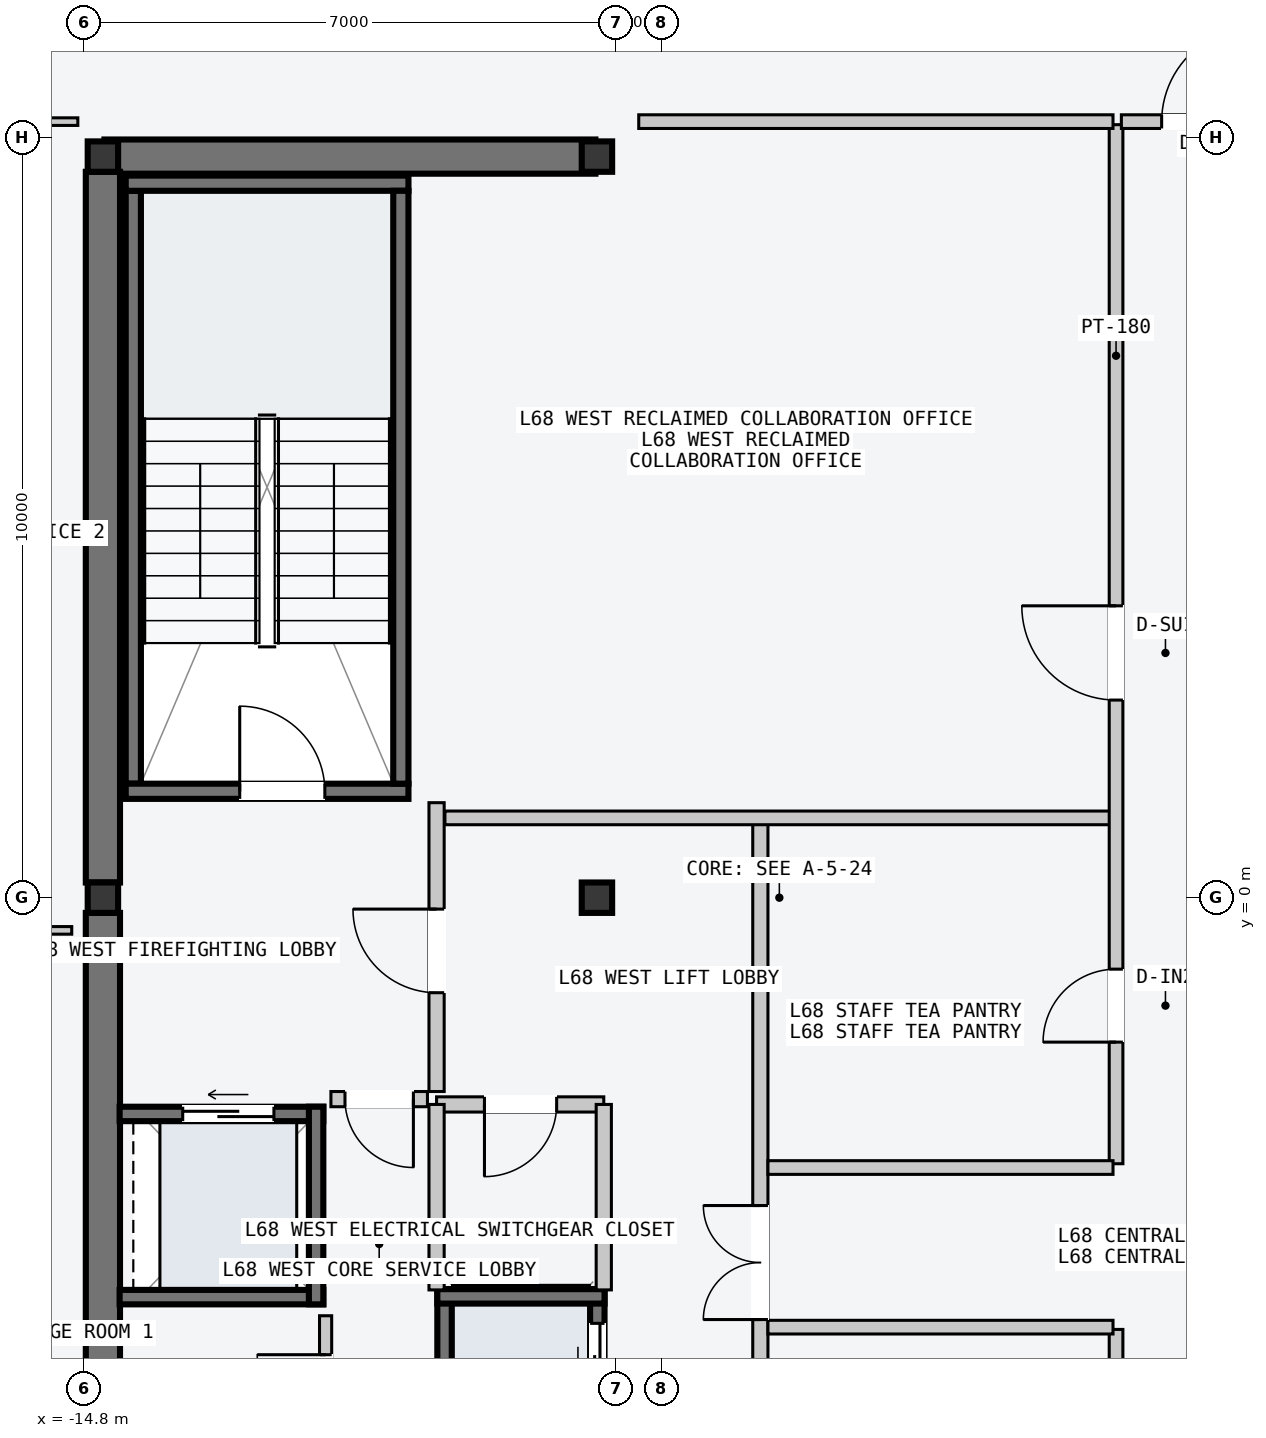
"""IFC4 building model, lengths in metres.
Left out: names, types, materials, properties, quantities, classifications, styles, units other than length and angle.
Written with IfcOpenShell. Run it as: python <this file> out.ifc"""

import sys

from ifc_helpers import new_model, si_unit, direction, frame, frame_2d, origin, origin_2d, place, context, subcontext, project, spatial, rectangle, i_section, extrude, element, fill, save


model = new_model("IFC4")
c1 = context("Model", 3, precision=1e-05, world=origin(), true_north=direction((0.0, 1.0)))
c2 = subcontext(c1, "Body", "Model", "MODEL_VIEW")
j1 = project(units=[si_unit("LENGTHUNIT", "METRE"), si_unit("PLANEANGLEUNIT", "RADIAN")], contexts=[c1])
p1 = place(None, origin())
s1 = spatial("IfcSite", under=j1, at=p1, CompositionType="ELEMENT")
p2 = place(p1, origin())
s2 = spatial("IfcBuilding", under=s1, at=p2, CompositionType="ELEMENT")
p3 = place(p2, frame((0.0, 0.0, 258.0)))
s3 = spatial("IfcBuildingStorey", under=s2, at=p3, CompositionType="ELEMENT", Elevation=258.0)
p4 = place(p3, frame((-14.53, 9.75, -0.2), z_axis=(0.0, 0.0, 1.0), x_axis=(1.0, 0.0, 0.0)))
e1 = element("IfcWall", 1, at=p4, inside=s3, PredefinedType="SHEAR", context=c2, shape_type="SweptSolid", body=[
    extrude(rectangle(XDim=6.46, YDim=0.45, at=frame_2d((3.23, 0.0))), origin(), (0.0, 0.0, 1.0), 3.6),
])
for number, where, z_axis, x_axis in (
    (2, (-14.55, -9.55, -0.2), (0.0, 0.0, 1.0), (0.0, 1.0, 0.0)),
    (3, (-14.55, 0.2, -0.2), (0.0, 0.0, 1.0), (0.0, 1.0, 0.0)),
):
    element("IfcWall", number, at=place(p3, frame(where, z_axis=z_axis, x_axis=x_axis)), inside=s3, PredefinedType="SHEAR", context=c2, shape_type="SweptSolid", body=[
        extrude(rectangle(XDim=9.35, YDim=0.45, at=frame_2d((4.675, 0.0))), origin(), (0.0, 0.0, 1.0), 3.6),
    ])
p5 = place(p3, frame((-14.15, 1.5, -0.2), z_axis=(0.0, 0.0, 1.0), x_axis=(0.0, 1.0, 0.0)))
e4 = element("IfcWall", 4, at=p5, inside=s3, PredefinedType="SOLIDWALL", context=c2, shape_type="SweptSolid", body=[
    extrude(rectangle(XDim=7.8, YDim=0.2, at=frame_2d((3.9, 0.0))), origin(), (0.0, 0.0, 1.0), 3.6),
])
p6 = place(p3, frame((-14.25, 1.4, -0.2), z_axis=(0.0, 0.0, 1.0), x_axis=(1.0, 0.0, 0.0)))
e5 = element("IfcWall", 5, at=p6, inside=s3, PredefinedType="SOLIDWALL", context=c2, shape_type="SweptSolid", body=[
    extrude(rectangle(XDim=3.72, YDim=0.2, at=frame_2d((1.86, 0.0))), origin(), (0.0, 0.0, 1.0), 3.6),
])
p7 = place(p6, frame((1.5, 0.0, 0.2)))
e6 = element("IfcOpeningElement", 6, at=p7, cuts=e5, PredefinedType="OPENING", context=c2, shape_type="SweptSolid", body=[
    extrude(rectangle(XDim=1.12, YDim=2.18, at=frame_2d((0.56, 1.09))), frame((0.0, 0.11, 0.0), z_axis=(0.0, -1.0, 0.0), x_axis=(1.0, 0.0, 0.0)), (0.0, 0.0, 1.0), 0.22),
])
p8 = place(p3, frame((-14.25, 9.4, -0.2), z_axis=(0.0, 0.0, 1.0), x_axis=(1.0, 0.0, 0.0)))
e7 = element("IfcWall", 7, at=p8, inside=s3, PredefinedType="SOLIDWALL", context=c2, shape_type="SweptSolid", body=[
    extrude(rectangle(XDim=3.72, YDim=0.2, at=frame_2d((1.86, 0.0))), origin(), (0.0, 0.0, 1.0), 3.6),
])
p9 = place(p3, frame((-10.63, 1.5, -0.2), z_axis=(0.0, 0.0, 1.0), x_axis=(0.0, 1.0, 0.0)))
e8 = element("IfcWall", 8, at=p9, inside=s3, PredefinedType="SOLIDWALL", context=c2, shape_type="SweptSolid", body=[
    extrude(rectangle(XDim=7.8, YDim=0.2, at=frame_2d((3.9, 0.0))), origin(), (0.0, 0.0, 1.0), 3.6),
])
for number, where, z_axis, x_axis in (
    (9, (-14.55, 0.0, 0.0), (0.0, 0.0, 1.0), (1.0, 0.0, 0.0)),
    (10, (-14.55, 9.75, 0.0), (0.0, 0.0, 1.0), (1.0, 0.0, 0.0)),
    (11, (-8.05, 0.0, 0.0), (0.0, 0.0, 1.0), (1.0, 0.0, 0.0)),
    (12, (-8.05, 9.75, 0.0), (0.0, 0.0, 1.0), (1.0, 0.0, 0.0)),
):
    element("IfcColumn", number, at=place(p3, frame(where, z_axis=z_axis, x_axis=x_axis)), inside=s3, PredefinedType="COLUMN", context=c2, shape_type="SweptSolid", body=[
        extrude(i_section(OverallWidth=0.4, OverallDepth=0.4, WebThickness=0.013, FlangeThickness=0.021, at=origin_2d()), origin(), (0.0, 0.0, 1.0), 3.6),
    ])
p10 = place(p3, frame((-8.045, -7.15, -0.2), z_axis=(0.0, 0.0, 1.0), x_axis=(0.0, 1.0, 0.0)))
e13 = element("IfcWall", 13, at=p10, inside=s3, PredefinedType="SOLIDWALL", context=c2, shape_type="SweptSolid", body=[
    extrude(rectangle(XDim=2.0, YDim=0.19, at=frame_2d((1.0, 0.0))), origin(), (0.0, 0.0, 1.0), 3.6),
])
p11 = place(p10, frame((0.45, 0.0, 0.2)))
e14 = element("IfcOpeningElement", 14, at=p11, cuts=e13, PredefinedType="OPENING", context=c2, shape_type="SweptSolid", body=[
    extrude(rectangle(XDim=1.1, YDim=2.2, at=frame_2d((0.55, 1.1))), frame((0.0, 0.105, 0.0), z_axis=(0.0, -1.0, 0.0), x_axis=(1.0, 0.0, 0.0)), (0.0, 0.0, 1.0), 0.21),
])
p12 = place(p3, frame((-10.055, -7.15, -0.2), z_axis=(0.0, 0.0, 1.0), x_axis=(0.0, 1.0, 0.0)))
e15 = element("IfcWall", 15, at=p12, inside=s3, PredefinedType="SOLIDWALL", context=c2, shape_type="SweptSolid", body=[
    extrude(rectangle(XDim=2.0, YDim=0.19, at=frame_2d((1.0, 0.0))), origin(), (0.0, 0.0, 1.0), 3.6),
])
p13 = place(p3, frame((-10.15, -5.245, -0.2), z_axis=(0.0, 0.0, 1.0), x_axis=(1.0, 0.0, 0.0)))
e16 = element("IfcWall", 16, at=p13, inside=s3, PredefinedType="SOLIDWALL", context=c2, shape_type="SweptSolid", body=[
    extrude(rectangle(XDim=2.2, YDim=0.19, at=frame_2d((1.1, 0.0))), origin(), (0.0, 0.0, 1.0), 3.6),
])
p14 = place(p3, frame((-14.33, -2.845, -0.2), z_axis=(0.0, 0.0, 1.0), x_axis=(1.0, 0.0, 0.0)))
e17 = element("IfcWall", 17, at=p14, inside=s3, PredefinedType="SOLIDWALL", context=c2, shape_type="SweptSolid", body=[
    extrude(rectangle(XDim=2.68, YDim=0.19, at=frame_2d((1.34, 0.0))), origin(), (0.0, 0.0, 1.0), 3.6),
])
p15 = place(p14, frame((0.83, 0.0, 0.2)))
e18 = element("IfcOpeningElement", 18, at=p15, cuts=e17, PredefinedType="OPENING", context=c2, shape_type="SweptSolid", body=[
    extrude(rectangle(XDim=1.2, YDim=2.2, at=frame_2d((0.6, 1.1))), frame((0.0, 0.105, 0.0), z_axis=(0.0, -1.0, 0.0), x_axis=(1.0, 0.0, 0.0)), (0.0, 0.0, 1.0), 0.21),
])
p16 = place(p3, frame((-14.33, -5.255, -0.2), z_axis=(0.0, 0.0, 1.0), x_axis=(1.0, 0.0, 0.0)))
e19 = element("IfcWall", 19, at=p16, inside=s3, PredefinedType="SOLIDWALL", context=c2, shape_type="SweptSolid", body=[
    extrude(rectangle(XDim=2.68, YDim=0.19, at=frame_2d((1.34, 0.0))), origin(), (0.0, 0.0, 1.0), 3.6),
])
p17 = place(p3, frame((-11.745, -5.35, -0.2), z_axis=(0.0, 0.0, 1.0), x_axis=(0.0, 1.0, 0.0)))
e20 = element("IfcWall", 20, at=p17, inside=s3, PredefinedType="SOLIDWALL", context=c2, shape_type="SweptSolid", body=[
    extrude(rectangle(XDim=2.6, YDim=0.19, at=frame_2d((1.3, 0.0))), origin(), (0.0, 0.0, 1.0), 3.6),
])
p18 = place(p3, frame((-5.9, -9.45, 0.0), z_axis=(0.0, 0.0, 1.0), x_axis=(0.0, 1.0, 0.0)))
e21 = element("IfcWall", 21, at=p18, inside=s3, PredefinedType="PARTITIONING", context=c2, shape_type="SweptSolid", body=[
    extrude(rectangle(XDim=10.5, YDim=0.2, at=frame_2d((5.25, 0.0))), origin(), (0.0, 0.0, 1.0), 3.4),
])
p19 = place(p18, frame((3.9, 0.0, 0.0)))
e22 = element("IfcOpeningElement", 22, at=p19, cuts=e21, PredefinedType="OPENING", context=c2, shape_type="SweptSolid", body=[
    extrude(rectangle(XDim=1.5, YDim=2.2, at=frame_2d((0.75, 1.1))), frame((0.0, 0.11, 0.0), z_axis=(0.0, -1.0, 0.0), x_axis=(1.0, 0.0, 0.0)), (0.0, 0.0, 1.0), 0.22),
])
p20 = place(p3, frame((-10.16, -2.55, 0.0), z_axis=(0.0, 0.0, 1.0), x_axis=(0.0, 1.0, 0.0)))
e23 = element("IfcWall", 23, at=p20, inside=s3, PredefinedType="PARTITIONING", context=c2, shape_type="SweptSolid", body=[
    extrude(rectangle(XDim=3.8, YDim=0.2, at=frame_2d((1.9, 0.0))), origin(), (0.0, 0.0, 1.0), 3.4),
])
p21 = place(p20, frame((1.3, 0.0, 0.0)))
e24 = element("IfcOpeningElement", 24, at=p21, cuts=e23, PredefinedType="OPENING", context=c2, shape_type="SweptSolid", body=[
    extrude(rectangle(XDim=1.1, YDim=2.15, at=frame_2d((0.55, 1.075))), frame((0.0, 0.11, 0.0), z_axis=(0.0, -1.0, 0.0), x_axis=(1.0, 0.0, 0.0)), (0.0, 0.0, 1.0), 0.22),
])
p22 = place(p3, frame((-10.28, -2.65, 0.0), z_axis=(0.0, 0.0, 1.0), x_axis=(-1.0, 0.0, 0.0)))
e25 = element("IfcWall", 25, at=p22, inside=s3, PredefinedType="PARTITIONING", context=c2, shape_type="SweptSolid", body=[
    extrude(rectangle(XDim=1.27, YDim=0.2, at=frame_2d((0.635, 0.0))), origin(), (0.0, 0.0, 1.0), 3.4),
])
p23 = place(p22, frame((0.185, 0.0, 0.0)))
e26 = element("IfcOpeningElement", 26, at=p23, cuts=e25, PredefinedType="OPENING", context=c2, shape_type="SweptSolid", body=[
    extrude(rectangle(XDim=0.9, YDim=2.15, at=frame_2d((0.45, 1.075))), frame((0.0, 0.11, 0.0), z_axis=(0.0, -1.0, 0.0), x_axis=(1.0, 0.0, 0.0)), (0.0, 0.0, 1.0), 0.22),
])
p24 = place(p3, frame((-7.96, -2.72, 0.0), z_axis=(0.0, 0.0, 1.0), x_axis=(-1.0, 0.0, 0.0)))
e27 = element("IfcWall", 27, at=p24, inside=s3, PredefinedType="PARTITIONING", context=c2, shape_type="SweptSolid", body=[
    extrude(rectangle(XDim=2.2, YDim=0.2, at=frame_2d((1.1, 0.0))), origin(), (0.0, 0.0, 1.0), 3.4),
])
p25 = place(p24, frame((0.62, 0.0, 0.0)))
e28 = element("IfcOpeningElement", 28, at=p25, cuts=e27, PredefinedType="OPENING", context=c2, shape_type="SweptSolid", body=[
    extrude(rectangle(XDim=0.95, YDim=2.1, at=frame_2d((0.475, 1.05))), frame((0.0, 0.11, 0.0), z_axis=(0.0, -1.0, 0.0), x_axis=(1.0, 0.0, 0.0)), (0.0, 0.0, 1.0), 0.22),
])
for number, where, z_axis, x_axis in (
    (29, (-7.96, -5.16, 0.0), (0.0, 0.0, 1.0), (0.0, 1.0, 0.0)),
    (30, (-10.16, -5.16, 0.0), (0.0, 0.0, 1.0), (0.0, 1.0, 0.0)),
):
    element("IfcWall", number, at=place(p3, frame(where, z_axis=z_axis, x_axis=x_axis)), inside=s3, PredefinedType="PARTITIONING", context=c2, shape_type="SweptSolid", body=[
        extrude(rectangle(XDim=2.44, YDim=0.2, at=frame_2d((1.22, 0.0))), origin(), (0.0, 0.0, 1.0), 3.4),
    ])
p26 = place(p3, frame((-11.62, -9.35, 0.0), z_axis=(0.0, 0.0, 1.0), x_axis=(0.0, 1.0, 0.0)))
e31 = element("IfcWall", 31, at=p26, inside=s3, PredefinedType="PARTITIONING", context=c2, shape_type="SweptSolid", body=[
    extrude(rectangle(XDim=3.85, YDim=0.16, at=frame_2d((1.925, 0.0))), origin(), (0.0, 0.0, 1.0), 3.4),
])
p27 = place(p26, frame((0.512, 0.0, 0.0)))
e32 = element("IfcOpeningElement", 32, at=p27, cuts=e31, PredefinedType="OPENING", context=c2, shape_type="SweptSolid", body=[
    extrude(rectangle(XDim=0.9, YDim=2.15, at=frame_2d((0.45, 1.075))), frame((0.0, 0.09, 0.0), z_axis=(0.0, -1.0, 0.0), x_axis=(1.0, 0.0, 0.0)), (0.0, 0.0, 1.0), 0.18),
])
p28 = place(p26, frame((2.438, 0.0, 0.0)))
e33 = element("IfcOpeningElement", 33, at=p28, cuts=e31, PredefinedType="OPENING", context=c2, shape_type="SweptSolid", body=[
    extrude(rectangle(XDim=0.9, YDim=2.15, at=frame_2d((0.45, 1.075))), frame((0.0, 0.09, 0.0), z_axis=(0.0, -1.0, 0.0), x_axis=(1.0, 0.0, 0.0)), (0.0, 0.0, 1.0), 0.18),
])
p29 = place(p3, frame((-10.05, 1.05, 0.0), z_axis=(0.0, 0.0, 1.0), x_axis=(1.0, 0.0, 0.0)))
e34 = element("IfcWall", 34, at=p29, inside=s3, PredefinedType="PARTITIONING", context=c2, shape_type="SweptSolid", body=[
    extrude(rectangle(XDim=8.79, YDim=0.18, at=frame_2d((4.395, 0.0))), origin(), (0.0, 0.0, 1.0), 3.4),
])
p30 = place(p3, frame((-1.22, -3.5, 0.0), z_axis=(0.0, 0.0, 1.0), x_axis=(0.0, 1.0, 0.0)))
e35 = element("IfcWall", 35, at=p30, inside=s3, PredefinedType="PARTITIONING", context=c2, shape_type="SweptSolid", body=[
    extrude(rectangle(XDim=13.67, YDim=0.18, at=frame_2d((6.835, 0.0))), origin(), (0.0, 0.0, 1.0), 3.4),
])
p31 = place(p30, frame((6.1, 0.0, 0.0)))
e36 = element("IfcOpeningElement", 36, at=p31, cuts=e35, PredefinedType="OPENING", context=c2, shape_type="SweptSolid", body=[
    extrude(rectangle(XDim=1.24, YDim=2.24, at=frame_2d((0.62, 1.12))), frame((0.0, 0.1, 0.0), z_axis=(0.0, -1.0, 0.0), x_axis=(1.0, 0.0, 0.0)), (0.0, 0.0, 1.0), 0.2),
])
p32 = place(p30, frame((1.6, 0.0, 0.0)))
e37 = element("IfcOpeningElement", 37, at=p32, cuts=e35, PredefinedType="OPENING", context=c2, shape_type="SweptSolid", body=[
    extrude(rectangle(XDim=0.96, YDim=2.18, at=frame_2d((0.48, 1.09))), frame((0.0, 0.1, 0.0), z_axis=(0.0, -1.0, 0.0), x_axis=(1.0, 0.0, 0.0)), (0.0, 0.0, 1.0), 0.2),
])
p33 = place(p3, frame((-7.5, 10.21, 0.0), z_axis=(0.0, 0.0, 1.0), x_axis=(1.0, 0.0, 0.0)))
e38 = element("IfcWall", 38, at=p33, inside=s3, PredefinedType="PARTITIONING", context=c2, shape_type="SweptSolid", body=[
    extrude(rectangle(XDim=6.24, YDim=0.18, at=frame_2d((3.12, 0.0))), origin(), (0.0, 0.0, 1.0), 3.4),
])
p34 = place(p3, frame((-5.8, -3.55, 0.0), z_axis=(0.0, 0.0, 1.0), x_axis=(1.0, 0.0, 0.0)))
e39 = element("IfcWall", 39, at=p34, inside=s3, PredefinedType="PARTITIONING", context=c2, shape_type="SweptSolid", body=[
    extrude(rectangle(XDim=4.54, YDim=0.18, at=frame_2d((2.27, 0.0))), origin(), (0.0, 0.0, 1.0), 3.4),
])
p35 = place(p3, frame((-1.22, -10.17, 0.0), z_axis=(0.0, 0.0, 1.0), x_axis=(0.0, 1.0, 0.0)))
e40 = element("IfcWall", 40, at=p35, inside=s3, PredefinedType="PARTITIONING", context=c2, shape_type="SweptSolid", body=[
    extrude(rectangle(XDim=4.49, YDim=0.18, at=frame_2d((2.245, 0.0))), origin(), (0.0, 0.0, 1.0), 3.4),
])
p36 = place(p35, frame((1.15, 0.0, 0.0)))
e41 = element("IfcOpeningElement", 41, at=p36, cuts=e40, PredefinedType="OPENING", context=c2, shape_type="SweptSolid", body=[
    extrude(rectangle(XDim=0.96, YDim=2.18, at=frame_2d((0.48, 1.09))), frame((0.0, 0.1, 0.0), z_axis=(0.0, -1.0, 0.0), x_axis=(1.0, 0.0, 0.0)), (0.0, 0.0, 1.0), 0.2),
])
p37 = place(p3, frame((-5.8, -5.65, 0.0), z_axis=(0.0, 0.0, 1.0), x_axis=(1.0, 0.0, 0.0)))
e42 = element("IfcWall", 42, at=p37, inside=s3, PredefinedType="PARTITIONING", context=c2, shape_type="SweptSolid", body=[
    extrude(rectangle(XDim=4.54, YDim=0.18, at=frame_2d((2.27, 0.0))), origin(), (0.0, 0.0, 1.0), 3.4),
])
p38 = place(p3, frame((-1.15, 10.21, 0.0), z_axis=(0.0, 0.0, 1.0), x_axis=(1.0, 0.0, 0.0)))
e43 = element("IfcWall", 43, at=p38, inside=s3, PredefinedType="PARTITIONING", context=c2, shape_type="SweptSolid", body=[
    extrude(rectangle(XDim=2.3, YDim=0.18, at=frame_2d((1.15, 0.0))), origin(), (0.0, 0.0, 1.0), 3.4),
])
p39 = place(p38, frame((0.53, 0.0, 0.0)))
e44 = element("IfcOpeningElement", 44, at=p39, cuts=e43, PredefinedType="OPENING", context=c2, shape_type="SweptSolid", body=[
    extrude(rectangle(XDim=1.24, YDim=2.24, at=frame_2d((0.62, 1.12))), frame((0.0, 0.1, 0.0), z_axis=(0.0, -1.0, 0.0), x_axis=(1.0, 0.0, 0.0)), (0.0, 0.0, 1.0), 0.2),
])
p40 = place(p3, frame((-18.56, 10.21, 0.0), z_axis=(0.0, 0.0, 1.0), x_axis=(1.0, 0.0, 0.0)))
e45 = element("IfcWall", 45, at=p40, inside=s3, PredefinedType="PARTITIONING", context=c2, shape_type="SweptSolid", body=[
    extrude(rectangle(XDim=3.68, YDim=0.1, at=frame_2d((1.84, 0.0))), origin(), (0.0, 0.0, 1.0), 3.4),
])
p41 = place(p40, frame((1.22, 0.0, 0.0)))
e46 = element("IfcOpeningElement", 46, at=p41, cuts=e45, PredefinedType="OPENING", context=c2, shape_type="SweptSolid", body=[
    extrude(rectangle(XDim=1.24, YDim=2.24, at=frame_2d((0.62, 1.12))), frame((0.0, 0.06, 0.0), z_axis=(0.0, -1.0, 0.0), x_axis=(1.0, 0.0, 0.0)), (0.0, 0.0, 1.0), 0.12),
])
p42 = place(p3, frame((-18.56, -0.43, 0.0), z_axis=(0.0, 0.0, 1.0), x_axis=(1.0, 0.0, 0.0)))
e47 = element("IfcWall", 47, at=p42, inside=s3, PredefinedType="PARTITIONING", context=c2, shape_type="SweptSolid", body=[
    extrude(rectangle(XDim=3.6, YDim=0.1, at=frame_2d((1.8, 0.0))), origin(), (0.0, 0.0, 1.0), 3.4),
])
p43 = place(p42, frame((0.9, 0.0, 0.0)))
e48 = element("IfcOpeningElement", 48, at=p43, cuts=e47, PredefinedType="OPENING", context=c2, shape_type="SweptSolid", body=[
    extrude(rectangle(XDim=0.96, YDim=2.18, at=frame_2d((0.48, 1.09))), frame((0.0, 0.06, 0.0), z_axis=(0.0, -1.0, 0.0), x_axis=(1.0, 0.0, 0.0)), (0.0, 0.0, 1.0), 0.12),
])
p44 = place(p7, origin())
e49 = element("IfcDoor", 49, at=p44, inside=s3, OperationType="SINGLE_SWING_LEFT", PredefinedType="DOOR", context=c2, shape_type="SweptSolid", body=[
    extrude(rectangle(XDim=1.12, YDim=2.18, at=frame_2d((0.56, 1.09))), frame((0.0, 0.025, 0.0), z_axis=(0.0, -1.0, 0.0), x_axis=(1.0, 0.0, 0.0)), (0.0, 0.0, 1.0), 0.05),
])
fill(e6, e49)
p45 = place(p11, origin())
e50 = element("IfcDoor", 50, at=p45, inside=s3, OperationType="SLIDING_TO_LEFT", PredefinedType="DOOR", context=c2, shape_type="SweptSolid", body=[
    extrude(rectangle(XDim=1.1, YDim=2.2, at=frame_2d((0.55, 1.1))), frame((0.0, 0.025, 0.0), z_axis=(0.0, -1.0, 0.0), x_axis=(1.0, 0.0, 0.0)), (0.0, 0.0, 1.0), 0.05),
])
fill(e14, e50)
p46 = place(p15, origin())
e51 = element("IfcDoor", 51, at=p46, inside=s3, OperationType="SLIDING_TO_LEFT", PredefinedType="DOOR", context=c2, shape_type="SweptSolid", body=[
    extrude(rectangle(XDim=1.2, YDim=2.2, at=frame_2d((0.6, 1.1))), frame((0.0, 0.025, 0.0), z_axis=(0.0, -1.0, 0.0), x_axis=(1.0, 0.0, 0.0)), (0.0, 0.0, 1.0), 0.05),
])
fill(e18, e51)
p47 = place(p19, origin())
e52 = element("IfcDoor", 52, at=p47, inside=s3, OperationType="DOUBLE_DOOR_SINGLE_SWING", PredefinedType="DOOR", context=c2, shape_type="SweptSolid", body=[
    extrude(rectangle(XDim=1.5, YDim=2.2, at=frame_2d((0.75, 1.1))), frame((0.0, 0.025, 0.0), z_axis=(0.0, -1.0, 0.0), x_axis=(1.0, 0.0, 0.0)), (0.0, 0.0, 1.0), 0.05),
])
fill(e22, e52)
p48 = place(p21, origin())
e53 = element("IfcDoor", 53, at=p48, inside=s3, OperationType="SINGLE_SWING_RIGHT", PredefinedType="DOOR", context=c2, shape_type="SweptSolid", body=[
    extrude(rectangle(XDim=1.1, YDim=2.15, at=frame_2d((0.55, 1.075))), frame((0.0, 0.025, 0.0), z_axis=(0.0, -1.0, 0.0), x_axis=(1.0, 0.0, 0.0)), (0.0, 0.0, 1.0), 0.05),
])
fill(e24, e53)
p49 = place(p23, origin())
e54 = element("IfcDoor", 54, at=p49, inside=s3, OperationType="SINGLE_SWING_LEFT", PredefinedType="DOOR", context=c2, shape_type="SweptSolid", body=[
    extrude(rectangle(XDim=0.9, YDim=2.15, at=frame_2d((0.45, 1.075))), frame((0.0, 0.025, 0.0), z_axis=(0.0, -1.0, 0.0), x_axis=(1.0, 0.0, 0.0)), (0.0, 0.0, 1.0), 0.05),
])
fill(e26, e54)
p50 = place(p25, origin())
e55 = element("IfcDoor", 55, at=p50, inside=s3, OperationType="SINGLE_SWING_RIGHT", PredefinedType="DOOR", context=c2, shape_type="SweptSolid", body=[
    extrude(rectangle(XDim=0.95, YDim=2.1, at=frame_2d((0.475, 1.05))), frame((0.0, 0.025, 0.0), z_axis=(0.0, -1.0, 0.0), x_axis=(1.0, 0.0, 0.0)), (0.0, 0.0, 1.0), 0.05),
])
fill(e28, e55)
p51 = place(p28, origin())
e56 = element("IfcDoor", 56, at=p51, inside=s3, OperationType="SINGLE_SWING_RIGHT", PredefinedType="DOOR", context=c2, shape_type="SweptSolid", body=[
    extrude(rectangle(XDim=0.9, YDim=2.15, at=frame_2d((0.45, 1.075))), frame((0.0, 0.025, 0.0), z_axis=(0.0, -1.0, 0.0), x_axis=(1.0, 0.0, 0.0)), (0.0, 0.0, 1.0), 0.05),
])
fill(e33, e56)
p52 = place(p31, origin())
e57 = element("IfcDoor", 57, at=p52, inside=s3, OperationType="SINGLE_SWING_RIGHT", PredefinedType="DOOR", context=c2, shape_type="SweptSolid", body=[
    extrude(rectangle(XDim=1.24, YDim=2.24, at=frame_2d((0.62, 1.12))), frame((0.0, 0.025, 0.0), z_axis=(0.0, -1.0, 0.0), x_axis=(1.0, 0.0, 0.0)), (0.0, 0.0, 1.0), 0.05),
])
fill(e36, e57)
p53 = place(p32, origin())
e58 = element("IfcDoor", 58, at=p53, inside=s3, OperationType="SINGLE_SWING_LEFT", PredefinedType="DOOR", context=c2, shape_type="SweptSolid", body=[
    extrude(rectangle(XDim=0.96, YDim=2.18, at=frame_2d((0.48, 1.09))), frame((0.0, 0.025, 0.0), z_axis=(0.0, -1.0, 0.0), x_axis=(1.0, 0.0, 0.0)), (0.0, 0.0, 1.0), 0.05),
])
fill(e37, e58)
p54 = place(p39, origin())
e59 = element("IfcDoor", 59, at=p54, inside=s3, OperationType="SINGLE_SWING_RIGHT", PredefinedType="DOOR", context=c2, shape_type="SweptSolid", body=[
    extrude(rectangle(XDim=1.24, YDim=2.24, at=frame_2d((0.62, 1.12))), frame((0.0, 0.025, 0.0), z_axis=(0.0, -1.0, 0.0), x_axis=(1.0, 0.0, 0.0)), (0.0, 0.0, 1.0), 0.05),
])
fill(e44, e59)
save(model, sys.argv[1])
